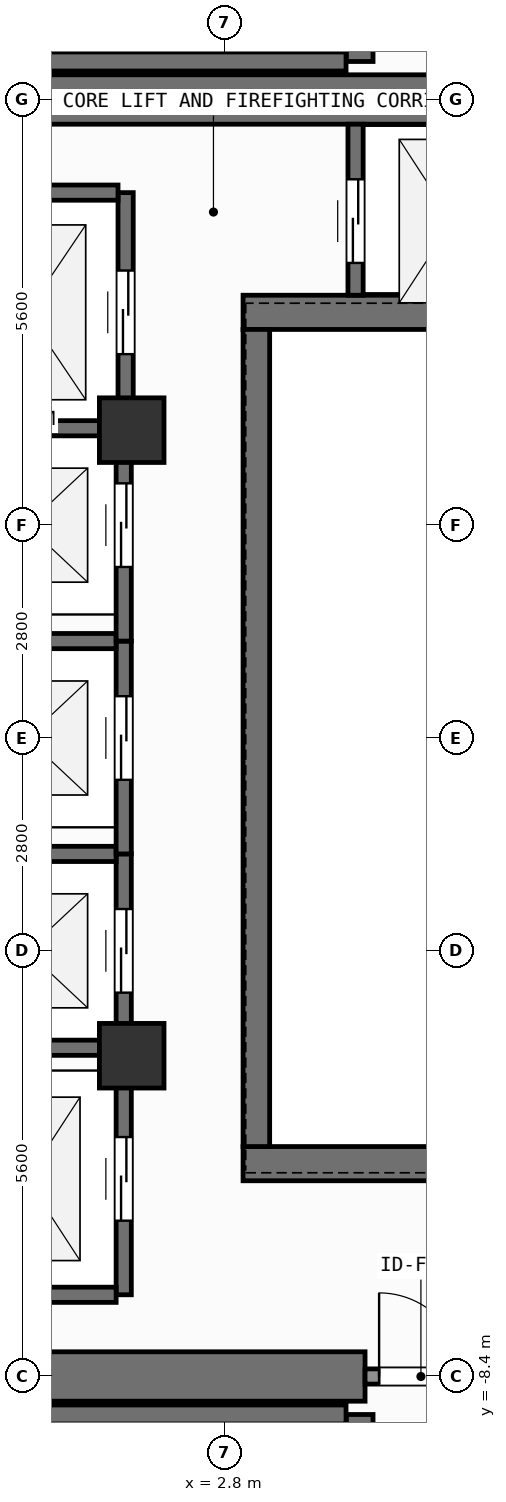
"""IFC4 building model, lengths in metres.
Left out: names, types, materials, properties, quantities, classifications, styles, units other than length and angle.
Written with IfcOpenShell. Run it as: python <this file> out.ifc"""

import sys

from ifc_helpers import new_model, si_unit, direction, frame, frame_2d, origin, origin_2d, place, context, subcontext, project, spatial, rectangle, extrude, element, fill, save


model = new_model("IFC4")
c1 = context("Model", 3, precision=1e-05, world=origin(), true_north=direction((0.0, 1.0)))
c2 = subcontext(c1, "Body", "Model", "MODEL_VIEW")
j1 = project(units=[si_unit("LENGTHUNIT", "METRE"), si_unit("PLANEANGLEUNIT", "RADIAN")], contexts=[c1])
p1 = place(None, origin())
s1 = spatial("IfcSite", under=j1, at=p1, CompositionType="ELEMENT")
p2 = place(p1, origin())
s2 = spatial("IfcBuilding", under=s1, at=p2, CompositionType="ELEMENT")
p3 = place(p2, frame((0.0, 0.0, 305.4)))
s3 = spatial("IfcBuildingStorey", under=s2, at=p3, CompositionType="ELEMENT", Elevation=305.4)
p4 = place(p3, frame((-2.62, -8.4, 0.0), z_axis=(0.0, 0.0, 1.0), x_axis=(1.0, 0.0, 0.0)))
e1 = element("IfcWall", 1, at=p4, inside=s3, PredefinedType="SHEAR", context=c2, shape_type="SweptSolid", body=[
    extrude(rectangle(XDim=7.27, YDim=0.65, at=frame_2d((3.635, 0.0))), origin(), (0.0, 0.0, 1.0), 3.9),
])
p5 = place(p3, frame((-7.55, 8.4, 0.0), z_axis=(0.0, 0.0, 1.0), x_axis=(1.0, 0.0, 0.0)))
e2 = element("IfcWall", 2, at=p5, inside=s3, PredefinedType="SHEAR", context=c2, shape_type="SweptSolid", body=[
    extrude(rectangle(XDim=16.275, YDim=0.65, at=frame_2d((8.138, 0.0))), origin(), (0.0, 0.0, 1.0), 3.9),
])
for number, where, z_axis, x_axis in (
    (3, (3.045, -5.6, 0.0), (0.0, 0.0, 1.0), (1.0, 0.0, 0.0)),
    (4, (3.045, 5.6, 0.0), (0.0, 0.0, 1.0), (1.0, 0.0, 0.0)),
):
    element("IfcWall", number, at=place(p3, frame(where, z_axis=z_axis, x_axis=x_axis)), inside=s3, PredefinedType="SHEAR", context=c2, shape_type="SweptSolid", body=[
        extrude(rectangle(XDim=5.68, YDim=0.45, at=frame_2d((2.84, 0.0))), origin(), (0.0, 0.0, 1.0), 3.9),
    ])
p6 = place(p3, frame((3.22, -5.375, 0.0), z_axis=(0.0, 0.0, 1.0), x_axis=(0.0, 1.0, 0.0)))
e5 = element("IfcWall", 5, at=p6, inside=s3, PredefinedType="SHEAR", context=c2, shape_type="SweptSolid", body=[
    extrude(rectangle(XDim=10.75, YDim=0.35, at=frame_2d((5.375, 0.0))), origin(), (0.0, 0.0, 1.0), 3.9),
])
p7 = place(p3, frame((-2.2, -8.9, 0.0), z_axis=(0.0, 0.0, 1.0), x_axis=(1.0, 0.0, 0.0)))
e6 = element("IfcWall", 6, at=p7, inside=s3, PredefinedType="SHEAR", context=c2, shape_type="SweptSolid", body=[
    extrude(rectangle(XDim=6.6, YDim=0.25, at=frame_2d((3.3, 0.0))), origin(), (0.0, 0.0, 1.0), 3.9),
])
p8 = place(p3, frame((4.58, -8.9, 0.0), z_axis=(0.0, 0.0, 1.0), x_axis=(0.0, -1.0, 0.0)))
e7 = element("IfcWall", 7, at=p8, inside=s3, PredefinedType="SHEAR", context=c2, shape_type="SweptSolid", body=[
    extrude(rectangle(XDim=2.925, YDim=0.35, at=frame_2d((1.462, 0.0))), origin(), (0.0, 0.0, 1.0), 3.9),
])
p9 = place(p8, frame((0.913, 0.0, 0.0)))
e8 = element("IfcOpeningElement", 8, at=p9, cuts=e7, PredefinedType="OPENING", context=c2, shape_type="SweptSolid", body=[
    extrude(rectangle(XDim=1.1, YDim=2.15, at=frame_2d((0.55, 1.075))), frame((0.0, 0.185, 0.0), z_axis=(0.0, -1.0, 0.0), x_axis=(1.0, 0.0, 0.0)), (0.0, 0.0, 1.0), 0.37),
])
p10 = place(p3, frame((-2.2, 8.9, 0.0), z_axis=(0.0, 0.0, 1.0), x_axis=(1.0, 0.0, 0.0)))
e9 = element("IfcWall", 9, at=p10, inside=s3, PredefinedType="SHEAR", context=c2, shape_type="SweptSolid", body=[
    extrude(rectangle(XDim=6.6, YDim=0.25, at=frame_2d((3.3, 0.0))), origin(), (0.0, 0.0, 1.0), 3.9),
])
p11 = place(p3, frame((4.58, 11.825, 0.0), z_axis=(0.0, 0.0, 1.0), x_axis=(0.0, -1.0, 0.0)))
e10 = element("IfcWall", 10, at=p11, inside=s3, PredefinedType="SHEAR", context=c2, shape_type="SweptSolid", body=[
    extrude(rectangle(XDim=2.925, YDim=0.35, at=frame_2d((1.462, 0.0))), origin(), (0.0, 0.0, 1.0), 3.9),
])
p12 = place(p11, frame((0.913, 0.0, 0.0)))
e11 = element("IfcOpeningElement", 11, at=p12, cuts=e10, PredefinedType="OPENING", context=c2, shape_type="SweptSolid", body=[
    extrude(rectangle(XDim=1.1, YDim=2.15, at=frame_2d((0.55, 1.075))), frame((0.0, 0.185, 0.0), z_axis=(0.0, -1.0, 0.0), x_axis=(1.0, 0.0, 0.0)), (0.0, 0.0, 1.0), 0.37),
])
for number, where, z_axis, x_axis in (
    (12, (1.58, -4.18, 0.0), (0.0, 0.0, 1.0), (1.0, 0.0, 0.0)),
    (13, (1.58, 4.05, 0.0), (0.0, 0.0, 1.0), (1.0, 0.0, 0.0)),
):
    element("IfcColumn", number, at=place(p3, frame(where, z_axis=z_axis, x_axis=x_axis)), inside=s3, PredefinedType="COLUMN", context=c2, shape_type="SweptSolid", body=[
        extrude(rectangle(XDim=0.85, YDim=0.85, at=origin_2d()), origin(), (0.0, 0.0, 1.0), 3.9),
    ])
p13 = place(p3, frame((1.475, -4.275, 0.0), z_axis=(0.0, 0.0, 1.0), x_axis=(0.0, 1.0, 0.0)))
e14 = element("IfcWall", 14, at=p13, inside=s3, PredefinedType="SHEAR", context=c2, shape_type="SweptSolid", body=[
    extrude(rectangle(XDim=2.75, YDim=0.2, at=frame_2d((1.375, 0.0))), origin(), (0.0, 0.0, 1.0), 3.68),
])
p14 = place(p13, frame((0.925, 0.0, 0.0)))
e15 = element("IfcOpeningElement", 15, at=p14, cuts=e14, PredefinedType="OPENING", context=c2, shape_type="SweptSolid", body=[
    extrude(rectangle(XDim=1.1, YDim=2.2, at=frame_2d((0.55, 1.1))), frame((0.0, 0.11, 0.0), z_axis=(0.0, -1.0, 0.0), x_axis=(1.0, 0.0, 0.0)), (0.0, 0.0, 1.0), 0.22),
])
for number, where, z_axis, x_axis in (
    (16, (-0.975, -4.075, 0.0), (0.0, 0.0, 1.0), (1.0, 0.0, 0.0)),
    (17, (-0.975, -1.525, 0.0), (0.0, 0.0, 1.0), (1.0, 0.0, 0.0)),
):
    element("IfcWall", number, at=place(p3, frame(where, z_axis=z_axis, x_axis=x_axis)), inside=s3, PredefinedType="SHEAR", context=c2, shape_type="SweptSolid", body=[
        extrude(rectangle(XDim=2.35, YDim=0.2, at=frame_2d((1.175, 0.0))), origin(), (0.0, 0.0, 1.0), 3.68),
    ])
p15 = place(p3, frame((1.475, -1.525, 0.0), z_axis=(0.0, 0.0, 1.0), x_axis=(0.0, 1.0, 0.0)))
e18 = element("IfcWall", 18, at=p15, inside=s3, PredefinedType="SHEAR", context=c2, shape_type="SweptSolid", body=[
    extrude(rectangle(XDim=2.8, YDim=0.2, at=frame_2d((1.4, 0.0))), origin(), (0.0, 0.0, 1.0), 3.68),
])
p16 = place(p15, frame((0.975, 0.0, 0.0)))
e19 = element("IfcOpeningElement", 19, at=p16, cuts=e18, PredefinedType="OPENING", context=c2, shape_type="SweptSolid", body=[
    extrude(rectangle(XDim=1.1, YDim=2.2, at=frame_2d((0.55, 1.1))), frame((0.0, 0.11, 0.0), z_axis=(0.0, -1.0, 0.0), x_axis=(1.0, 0.0, 0.0)), (0.0, 0.0, 1.0), 0.22),
])
p17 = place(p3, frame((-0.975, 1.275, 0.0), z_axis=(0.0, 0.0, 1.0), x_axis=(1.0, 0.0, 0.0)))
e20 = element("IfcWall", 20, at=p17, inside=s3, PredefinedType="SHEAR", context=c2, shape_type="SweptSolid", body=[
    extrude(rectangle(XDim=2.35, YDim=0.2, at=frame_2d((1.175, 0.0))), origin(), (0.0, 0.0, 1.0), 3.68),
])
p18 = place(p3, frame((1.475, 1.275, 0.0), z_axis=(0.0, 0.0, 1.0), x_axis=(0.0, 1.0, 0.0)))
e21 = element("IfcWall", 21, at=p18, inside=s3, PredefinedType="SHEAR", context=c2, shape_type="SweptSolid", body=[
    extrude(rectangle(XDim=2.8, YDim=0.2, at=frame_2d((1.4, 0.0))), origin(), (0.0, 0.0, 1.0), 3.68),
])
p19 = place(p18, frame((0.975, 0.0, 0.0)))
e22 = element("IfcOpeningElement", 22, at=p19, cuts=e21, PredefinedType="OPENING", context=c2, shape_type="SweptSolid", body=[
    extrude(rectangle(XDim=1.1, YDim=2.2, at=frame_2d((0.55, 1.1))), frame((0.0, 0.11, 0.0), z_axis=(0.0, -1.0, 0.0), x_axis=(1.0, 0.0, 0.0)), (0.0, 0.0, 1.0), 0.22),
])
p20 = place(p3, frame((-0.975, 4.075, 0.0), z_axis=(0.0, 0.0, 1.0), x_axis=(1.0, 0.0, 0.0)))
e23 = element("IfcWall", 23, at=p20, inside=s3, PredefinedType="SHEAR", context=c2, shape_type="SweptSolid", body=[
    extrude(rectangle(XDim=2.35, YDim=0.2, at=frame_2d((1.175, 0.0))), origin(), (0.0, 0.0, 1.0), 3.68),
])
p21 = place(p3, frame((1.5, 4.025, 0.0), z_axis=(0.0, 0.0, 1.0), x_axis=(0.0, 1.0, 0.0)))
e24 = element("IfcWall", 24, at=p21, inside=s3, PredefinedType="SHEAR", context=c2, shape_type="SweptSolid", body=[
    extrude(rectangle(XDim=3.15, YDim=0.2, at=frame_2d((1.575, 0.0))), origin(), (0.0, 0.0, 1.0), 3.68),
])
p22 = place(p21, frame((1.025, 0.0, 0.0)))
e25 = element("IfcOpeningElement", 25, at=p22, cuts=e24, PredefinedType="OPENING", context=c2, shape_type="SweptSolid", body=[
    extrude(rectangle(XDim=1.1, YDim=2.2, at=frame_2d((0.55, 1.1))), frame((0.0, 0.11, 0.0), z_axis=(0.0, -1.0, 0.0), x_axis=(1.0, 0.0, 0.0)), (0.0, 0.0, 1.0), 0.22),
])
p23 = place(p3, frame((-1.0, 7.175, 0.0), z_axis=(0.0, 0.0, 1.0), x_axis=(1.0, 0.0, 0.0)))
e26 = element("IfcWall", 26, at=p23, inside=s3, PredefinedType="SHEAR", context=c2, shape_type="SweptSolid", body=[
    extrude(rectangle(XDim=2.4, YDim=0.2, at=frame_2d((1.2, 0.0))), origin(), (0.0, 0.0, 1.0), 3.68),
])
p24 = place(p3, frame((1.475, -7.325, 0.0), z_axis=(0.0, 0.0, 1.0), x_axis=(0.0, 1.0, 0.0)))
e27 = element("IfcWall", 27, at=p24, inside=s3, PredefinedType="SHEAR", context=c2, shape_type="SweptSolid", body=[
    extrude(rectangle(XDim=3.05, YDim=0.2, at=frame_2d((1.525, 0.0))), origin(), (0.0, 0.0, 1.0), 3.68),
])
p25 = place(p24, frame((0.975, 0.0, 0.0)))
e28 = element("IfcOpeningElement", 28, at=p25, cuts=e27, PredefinedType="OPENING", context=c2, shape_type="SweptSolid", body=[
    extrude(rectangle(XDim=1.1, YDim=2.2, at=frame_2d((0.55, 1.1))), frame((0.0, 0.11, 0.0), z_axis=(0.0, -1.0, 0.0), x_axis=(1.0, 0.0, 0.0)), (0.0, 0.0, 1.0), 0.22),
])
p26 = place(p3, frame((-0.975, -7.325, 0.0), z_axis=(0.0, 0.0, 1.0), x_axis=(1.0, 0.0, 0.0)))
e29 = element("IfcWall", 29, at=p26, inside=s3, PredefinedType="SHEAR", context=c2, shape_type="SweptSolid", body=[
    extrude(rectangle(XDim=2.35, YDim=0.2, at=frame_2d((1.175, 0.0))), origin(), (0.0, 0.0, 1.0), 3.68),
])
p27 = place(p3, frame((4.525, 5.825, 0.0), z_axis=(0.0, 0.0, 1.0), x_axis=(0.0, 1.0, 0.0)))
e30 = element("IfcWall", 30, at=p27, inside=s3, PredefinedType="SHEAR", context=c2, shape_type="SweptSolid", body=[
    extrude(rectangle(XDim=2.25, YDim=0.2, at=frame_2d((1.125, 0.0))), origin(), (0.0, 0.0, 1.0), 3.68),
])
p28 = place(p27, frame((0.425, 0.0, 0.0)))
e31 = element("IfcOpeningElement", 31, at=p28, cuts=e30, PredefinedType="OPENING", context=c2, shape_type="SweptSolid", body=[
    extrude(rectangle(XDim=1.1, YDim=2.2, at=frame_2d((0.55, 1.1))), frame((0.0, 0.11, 0.0), z_axis=(0.0, -1.0, 0.0), x_axis=(1.0, 0.0, 0.0)), (0.0, 0.0, 1.0), 0.22),
])
p29 = place(p3, frame((4.65, -8.4, 0.0), z_axis=(0.0, 0.0, 1.0), x_axis=(1.0, 0.0, 0.0)))
e32 = element("IfcWall", 32, at=p29, inside=s3, PredefinedType="SOLIDWALL", context=c2, shape_type="SweptSolid", body=[
    extrude(rectangle(XDim=1.47, YDim=0.2, at=frame_2d((0.735, 0.0))), origin(), (0.0, 0.0, 1.0), 2.92),
])
p30 = place(p29, frame((0.185, 0.0, 0.0)))
e33 = element("IfcOpeningElement", 33, at=p30, cuts=e32, PredefinedType="OPENING", context=c2, shape_type="SweptSolid", body=[
    extrude(rectangle(XDim=1.1, YDim=2.15, at=frame_2d((0.55, 1.075))), frame((0.0, 0.11, 0.0), z_axis=(0.0, -1.0, 0.0), x_axis=(1.0, 0.0, 0.0)), (0.0, 0.0, 1.0), 0.22),
])
p31 = place(p14, origin())
e34 = element("IfcDoor", 34, at=p31, inside=s3, OperationType="SLIDING_TO_LEFT", PredefinedType="DOOR", context=c2, shape_type="SweptSolid", body=[
    extrude(rectangle(XDim=1.1, YDim=2.2, at=frame_2d((0.55, 1.1))), frame((0.0, 0.025, 0.0), z_axis=(0.0, -1.0, 0.0), x_axis=(1.0, 0.0, 0.0)), (0.0, 0.0, 1.0), 0.05),
])
fill(e15, e34)
p32 = place(p16, origin())
e35 = element("IfcDoor", 35, at=p32, inside=s3, OperationType="SLIDING_TO_LEFT", PredefinedType="DOOR", context=c2, shape_type="SweptSolid", body=[
    extrude(rectangle(XDim=1.1, YDim=2.2, at=frame_2d((0.55, 1.1))), frame((0.0, 0.025, 0.0), z_axis=(0.0, -1.0, 0.0), x_axis=(1.0, 0.0, 0.0)), (0.0, 0.0, 1.0), 0.05),
])
fill(e19, e35)
p33 = place(p19, origin())
e36 = element("IfcDoor", 36, at=p33, inside=s3, OperationType="SLIDING_TO_LEFT", PredefinedType="DOOR", context=c2, shape_type="SweptSolid", body=[
    extrude(rectangle(XDim=1.1, YDim=2.2, at=frame_2d((0.55, 1.1))), frame((0.0, 0.025, 0.0), z_axis=(0.0, -1.0, 0.0), x_axis=(1.0, 0.0, 0.0)), (0.0, 0.0, 1.0), 0.05),
])
fill(e22, e36)
p34 = place(p22, origin())
e37 = element("IfcDoor", 37, at=p34, inside=s3, OperationType="SLIDING_TO_LEFT", PredefinedType="DOOR", context=c2, shape_type="SweptSolid", body=[
    extrude(rectangle(XDim=1.1, YDim=2.2, at=frame_2d((0.55, 1.1))), frame((0.0, 0.025, 0.0), z_axis=(0.0, -1.0, 0.0), x_axis=(1.0, 0.0, 0.0)), (0.0, 0.0, 1.0), 0.05),
])
fill(e25, e37)
p35 = place(p25, origin())
e38 = element("IfcDoor", 38, at=p35, inside=s3, OperationType="SLIDING_TO_LEFT", PredefinedType="DOOR", context=c2, shape_type="SweptSolid", body=[
    extrude(rectangle(XDim=1.1, YDim=2.2, at=frame_2d((0.55, 1.1))), frame((0.0, 0.025, 0.0), z_axis=(0.0, -1.0, 0.0), x_axis=(1.0, 0.0, 0.0)), (0.0, 0.0, 1.0), 0.05),
])
fill(e28, e38)
p36 = place(p28, origin())
e39 = element("IfcDoor", 39, at=p36, inside=s3, OperationType="SLIDING_TO_LEFT", PredefinedType="DOOR", context=c2, shape_type="SweptSolid", body=[
    extrude(rectangle(XDim=1.1, YDim=2.2, at=frame_2d((0.55, 1.1))), frame((0.0, 0.025, 0.0), z_axis=(0.0, -1.0, 0.0), x_axis=(1.0, 0.0, 0.0)), (0.0, 0.0, 1.0), 0.05),
])
fill(e31, e39)
p37 = place(p30, origin())
e40 = element("IfcDoor", 40, at=p37, inside=s3, OperationType="SINGLE_SWING_LEFT", PredefinedType="DOOR", context=c2, shape_type="SweptSolid", body=[
    extrude(rectangle(XDim=1.1, YDim=2.15, at=frame_2d((0.55, 1.075))), frame((0.0, 0.025, 0.0), z_axis=(0.0, -1.0, 0.0), x_axis=(1.0, 0.0, 0.0)), (0.0, 0.0, 1.0), 0.05),
])
fill(e33, e40)
save(model, sys.argv[1])
